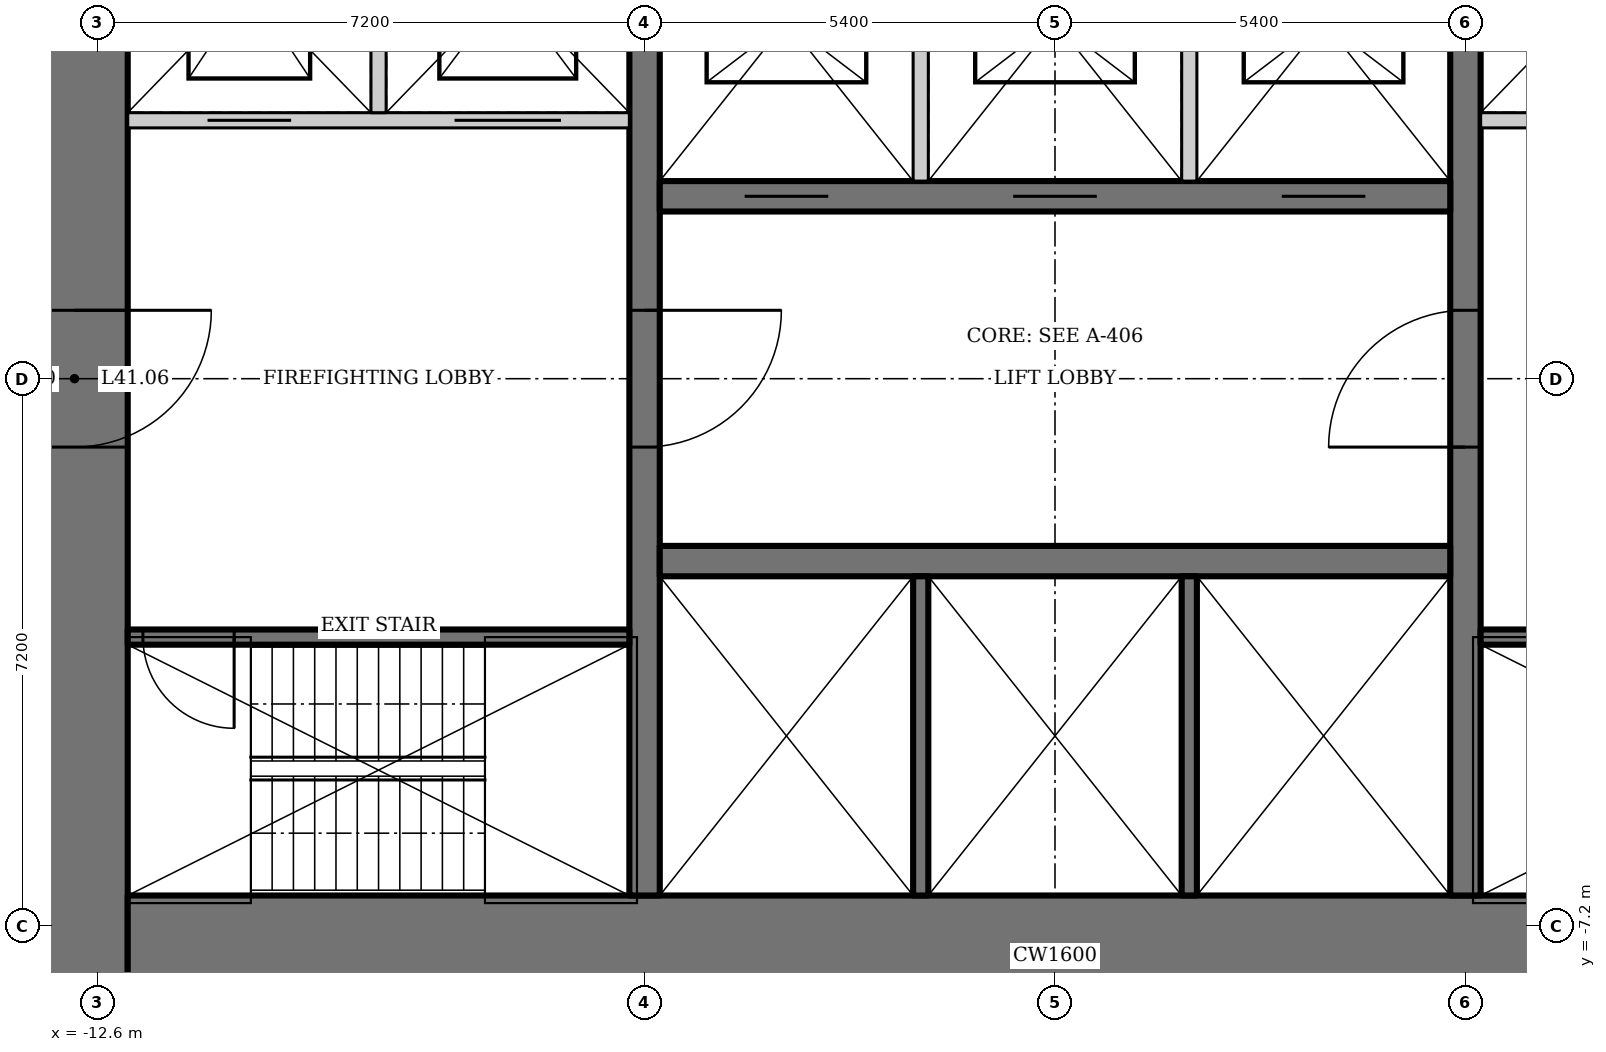
"""IFC4 building model, lengths in metres.
Left out: names, types, materials, properties, quantities, classifications, styles, units other than length and angle.
Written with IfcOpenShell. Run it as: python <this file> out.ifc"""

import sys

from ifc_helpers import new_model, si_unit, direction, frame, frame_2d, origin, place, context, subcontext, project, spatial, rectangle, extrude, element, fill, save


model = new_model("IFC4")
c1 = context("Model", 3, precision=1e-05, world=origin(), true_north=direction((0.0, 1.0)))
c2 = subcontext(c1, "Body", "Model", "MODEL_VIEW")
j1 = project(units=[si_unit("LENGTHUNIT", "METRE"), si_unit("PLANEANGLEUNIT", "RADIAN")], contexts=[c1])
p1 = place(None, origin())
s1 = spatial("IfcSite", under=j1, at=p1, CompositionType="ELEMENT")
p2 = place(p1, origin())
s2 = spatial("IfcBuilding", under=s1, at=p2, CompositionType="ELEMENT")
p3 = place(p2, frame((0.0, 0.0, 176.2)))
s3 = spatial("IfcBuildingStorey", under=s2, at=p3, CompositionType="ELEMENT", Elevation=176.2)
p4 = place(p3, frame((-12.9, 13.0, 0.0), z_axis=(0.0, 0.0, 1.0), x_axis=(0.0, -1.0, 0.0)))
e1 = element("IfcWall", 1, at=p4, inside=s3, PredefinedType="SHEAR", context=c2, shape_type="SweptSolid", body=[
    extrude(rectangle(XDim=26.0, YDim=1.4, at=frame_2d((13.0, 0.0))), origin(), (0.0, 0.0, 1.0), 4.2),
])
p5 = place(p4, frame((12.1, 0.0, 0.0)))
e2 = element("IfcOpeningElement", 2, at=p5, cuts=e1, PredefinedType="OPENING", context=c2, shape_type="SweptSolid", body=[
    extrude(rectangle(XDim=1.8, YDim=2.1, at=frame_2d((0.9, 1.05))), frame((0.0, 0.71, 0.0), z_axis=(0.0, -1.0, 0.0), x_axis=(1.0, 0.0, 0.0)), (0.0, 0.0, 1.0), 1.42),
])
p6 = place(p3, frame((-12.2, -7.6, 0.0), z_axis=(0.0, 0.0, 1.0), x_axis=(1.0, 0.0, 0.0)))
e3 = element("IfcWall", 3, at=p6, inside=s3, PredefinedType="SHEAR", context=c2, shape_type="SweptSolid", body=[
    extrude(rectangle(XDim=24.4, YDim=1.6, at=frame_2d((12.2, 0.0))), origin(), (0.0, 0.0, 1.0), 4.2),
])
p7 = place(p3, frame((5.4, -6.8, 0.0), z_axis=(0.0, 0.0, 1.0), x_axis=(0.0, 1.0, 0.0)))
e4 = element("IfcWall", 4, at=p7, inside=s3, PredefinedType="SHEAR", context=c2, shape_type="SweptSolid", body=[
    extrude(rectangle(XDim=13.6, YDim=0.4, at=frame_2d((6.8, 0.0))), origin(), (0.0, 0.0, 1.0), 4.2),
])
p8 = place(p7, frame((5.9, 0.0, 0.0)))
e5 = element("IfcOpeningElement", 5, at=p8, cuts=e4, PredefinedType="OPENING", context=c2, shape_type="SweptSolid", body=[
    extrude(rectangle(XDim=1.8, YDim=2.1, at=frame_2d((0.9, 1.05))), frame((0.0, 0.21, 0.0), z_axis=(0.0, -1.0, 0.0), x_axis=(1.0, 0.0, 0.0)), (0.0, 0.0, 1.0), 0.42),
])
p9 = place(p3, frame((-5.4, 6.8, 0.0), z_axis=(0.0, 0.0, 1.0), x_axis=(0.0, -1.0, 0.0)))
e6 = element("IfcWall", 6, at=p9, inside=s3, PredefinedType="SHEAR", context=c2, shape_type="SweptSolid", body=[
    extrude(rectangle(XDim=13.6, YDim=0.4, at=frame_2d((6.8, 0.0))), origin(), (0.0, 0.0, 1.0), 4.2),
])
p10 = place(p9, frame((5.9, 0.0, 0.0)))
e7 = element("IfcOpeningElement", 7, at=p10, cuts=e6, PredefinedType="OPENING", context=c2, shape_type="SweptSolid", body=[
    extrude(rectangle(XDim=1.8, YDim=2.1, at=frame_2d((0.9, 1.05))), frame((0.0, 0.21, 0.0), z_axis=(0.0, -1.0, 0.0), x_axis=(1.0, 0.0, 0.0)), (0.0, 0.0, 1.0), 0.42),
])
p11 = place(p3, frame((-5.2, -2.4, 0.0), z_axis=(0.0, 0.0, 1.0), x_axis=(1.0, 0.0, 0.0)))
e8 = element("IfcWall", 8, at=p11, inside=s3, PredefinedType="SHEAR", context=c2, shape_type="SweptSolid", body=[
    extrude(rectangle(XDim=10.4, YDim=0.4, at=frame_2d((5.2, 0.0))), origin(), (0.0, 0.0, 1.0), 4.2),
])
for number, where, z_axis, x_axis in (
    (9, (-1.767, -2.6, 0.0), (0.0, 0.0, 1.0), (0.0, -1.0, 0.0)),
    (10, (1.767, -2.6, 0.0), (0.0, 0.0, 1.0), (0.0, -1.0, 0.0)),
):
    element("IfcWall", number, at=place(p3, frame(where, z_axis=z_axis, x_axis=x_axis)), inside=s3, PredefinedType="SOLIDWALL", context=c2, shape_type="SweptSolid", body=[
        extrude(rectangle(XDim=4.2, YDim=0.2, at=frame_2d((2.1, 0.0))), origin(), (0.0, 0.0, 1.0), 4.2),
    ])
p12 = place(p3, frame((5.2, 2.4, 0.0), z_axis=(0.0, 0.0, 1.0), x_axis=(-1.0, 0.0, 0.0)))
e11 = element("IfcWall", 11, at=p12, inside=s3, PredefinedType="SHEAR", context=c2, shape_type="SweptSolid", body=[
    extrude(rectangle(XDim=10.4, YDim=0.4, at=frame_2d((5.2, 0.0))), origin(), (0.0, 0.0, 1.0), 4.2),
])
p13 = place(p12, frame((8.183, 0.0, 0.0)))
e12 = element("IfcOpeningElement", 12, at=p13, cuts=e11, PredefinedType="OPENING", context=c2, shape_type="SweptSolid", body=[
    extrude(rectangle(XDim=1.1, YDim=2.2, at=frame_2d((0.55, 1.1))), frame((0.0, 0.21, 0.0), z_axis=(0.0, -1.0, 0.0), x_axis=(1.0, 0.0, 0.0)), (0.0, 0.0, 1.0), 0.42),
])
p14 = place(p12, frame((4.65, 0.0, 0.0)))
e13 = element("IfcOpeningElement", 13, at=p14, cuts=e11, PredefinedType="OPENING", context=c2, shape_type="SweptSolid", body=[
    extrude(rectangle(XDim=1.1, YDim=2.2, at=frame_2d((0.55, 1.1))), frame((0.0, 0.21, 0.0), z_axis=(0.0, -1.0, 0.0), x_axis=(1.0, 0.0, 0.0)), (0.0, 0.0, 1.0), 0.42),
])
p15 = place(p12, frame((1.117, 0.0, 0.0)))
e14 = element("IfcOpeningElement", 14, at=p15, cuts=e11, PredefinedType="OPENING", context=c2, shape_type="SweptSolid", body=[
    extrude(rectangle(XDim=1.1, YDim=2.2, at=frame_2d((0.55, 1.1))), frame((0.0, 0.21, 0.0), z_axis=(0.0, -1.0, 0.0), x_axis=(1.0, 0.0, 0.0)), (0.0, 0.0, 1.0), 0.42),
])
for number, where, z_axis, x_axis in (
    (15, (-1.767, 2.6, 0.0), (0.0, 0.0, 1.0), (0.0, 1.0, 0.0)),
    (16, (1.767, 2.6, 0.0), (0.0, 0.0, 1.0), (0.0, 1.0, 0.0)),
):
    element("IfcWall", number, at=place(p3, frame(where, z_axis=z_axis, x_axis=x_axis)), inside=s3, PredefinedType="SOLIDWALL", context=c2, shape_type="SweptSolid", body=[
        extrude(rectangle(XDim=4.2, YDim=0.2, at=frame_2d((2.1, 0.0))), origin(), (0.0, 0.0, 1.0), 4.2),
    ])
p16 = place(p3, frame((5.6, -3.4, 0.0), z_axis=(0.0, 0.0, 1.0), x_axis=(1.0, 0.0, 0.0)))
e17 = element("IfcWall", 17, at=p16, inside=s3, PredefinedType="SHEAR", context=c2, shape_type="SweptSolid", body=[
    extrude(rectangle(XDim=6.6, YDim=0.2, at=frame_2d((3.3, 0.0))), origin(), (0.0, 0.0, 1.0), 4.2),
])
p17 = place(p16, frame((5.2, 0.0, 0.0)))
e18 = element("IfcOpeningElement", 18, at=p17, cuts=e17, PredefinedType="OPENING", context=c2, shape_type="SweptSolid", body=[
    extrude(rectangle(XDim=1.2, YDim=2.1, at=frame_2d((0.6, 1.05))), frame((0.0, 0.11, 0.0), z_axis=(0.0, -1.0, 0.0), x_axis=(1.0, 0.0, 0.0)), (0.0, 0.0, 1.0), 0.22),
])
p18 = place(p3, frame((12.2, 3.4, 0.0), z_axis=(0.0, 0.0, 1.0), x_axis=(-1.0, 0.0, 0.0)))
e19 = element("IfcWall", 19, at=p18, inside=s3, PredefinedType="SOLIDWALL", context=c2, shape_type="SweptSolid", body=[
    extrude(rectangle(XDim=6.6, YDim=0.2, at=frame_2d((3.3, 0.0))), origin(), (0.0, 0.0, 1.0), 4.2),
])
p19 = place(p18, frame((4.45, 0.0, 0.0)))
e20 = element("IfcOpeningElement", 20, at=p19, cuts=e19, PredefinedType="OPENING", context=c2, shape_type="SweptSolid", body=[
    extrude(rectangle(XDim=1.1, YDim=2.2, at=frame_2d((0.55, 1.1))), frame((0.0, 0.11, 0.0), z_axis=(0.0, -1.0, 0.0), x_axis=(1.0, 0.0, 0.0)), (0.0, 0.0, 1.0), 0.22),
])
p20 = place(p18, frame((0.9, 0.0, 0.0)))
e21 = element("IfcOpeningElement", 21, at=p20, cuts=e19, PredefinedType="OPENING", context=c2, shape_type="SweptSolid", body=[
    extrude(rectangle(XDim=1.4, YDim=2.2, at=frame_2d((0.7, 1.1))), frame((0.0, 0.11, 0.0), z_axis=(0.0, -1.0, 0.0), x_axis=(1.0, 0.0, 0.0)), (0.0, 0.0, 1.0), 0.22),
])
p21 = place(p3, frame((-5.6, -3.4, 0.0), z_axis=(0.0, 0.0, 1.0), x_axis=(-1.0, 0.0, 0.0)))
e22 = element("IfcWall", 22, at=p21, inside=s3, PredefinedType="SHEAR", context=c2, shape_type="SweptSolid", body=[
    extrude(rectangle(XDim=6.6, YDim=0.2, at=frame_2d((3.3, 0.0))), origin(), (0.0, 0.0, 1.0), 4.2),
])
p22 = place(p21, frame((5.2, 0.0, 0.0)))
e23 = element("IfcOpeningElement", 23, at=p22, cuts=e22, PredefinedType="OPENING", context=c2, shape_type="SweptSolid", body=[
    extrude(rectangle(XDim=1.2, YDim=2.1, at=frame_2d((0.6, 1.05))), frame((0.0, 0.11, 0.0), z_axis=(0.0, -1.0, 0.0), x_axis=(1.0, 0.0, 0.0)), (0.0, 0.0, 1.0), 0.22),
])
p23 = place(p3, frame((-12.2, 3.4, 0.0), z_axis=(0.0, 0.0, 1.0), x_axis=(1.0, 0.0, 0.0)))
e24 = element("IfcWall", 24, at=p23, inside=s3, PredefinedType="SOLIDWALL", context=c2, shape_type="SweptSolid", body=[
    extrude(rectangle(XDim=6.6, YDim=0.2, at=frame_2d((3.3, 0.0))), origin(), (0.0, 0.0, 1.0), 4.2),
])
p24 = place(p23, frame((1.05, 0.0, 0.0)))
e25 = element("IfcOpeningElement", 25, at=p24, cuts=e24, PredefinedType="OPENING", context=c2, shape_type="SweptSolid", body=[
    extrude(rectangle(XDim=1.1, YDim=2.2, at=frame_2d((0.55, 1.1))), frame((0.0, 0.11, 0.0), z_axis=(0.0, -1.0, 0.0), x_axis=(1.0, 0.0, 0.0)), (0.0, 0.0, 1.0), 0.22),
])
p25 = place(p23, frame((4.3, 0.0, 0.0)))
e26 = element("IfcOpeningElement", 26, at=p25, cuts=e24, PredefinedType="OPENING", context=c2, shape_type="SweptSolid", body=[
    extrude(rectangle(XDim=1.4, YDim=2.2, at=frame_2d((0.7, 1.1))), frame((0.0, 0.11, 0.0), z_axis=(0.0, -1.0, 0.0), x_axis=(1.0, 0.0, 0.0)), (0.0, 0.0, 1.0), 0.22),
])
p26 = place(p3, frame((-8.9, 3.5, 0.0), z_axis=(0.0, 0.0, 1.0), x_axis=(0.0, 1.0, 0.0)))
e27 = element("IfcWall", 27, at=p26, inside=s3, PredefinedType="SOLIDWALL", context=c2, shape_type="SweptSolid", body=[
    extrude(rectangle(XDim=3.3, YDim=0.2, at=frame_2d((1.65, 0.0))), origin(), (0.0, 0.0, 1.0), 4.2),
])
p27 = place(p8, origin())
e28 = element("IfcDoor", 28, at=p27, inside=s3, OperationType="DOUBLE_DOOR_DOUBLE_SWING", PredefinedType="DOOR", context=c2, shape_type="SweptSolid", body=[
    extrude(rectangle(XDim=1.8, YDim=2.1, at=frame_2d((0.9, 1.05))), frame((0.0, 0.025, 0.0), z_axis=(0.0, -1.0, 0.0), x_axis=(1.0, 0.0, 0.0)), (0.0, 0.0, 1.0), 0.05),
])
fill(e5, e28)
p28 = place(p10, origin())
e29 = element("IfcDoor", 29, at=p28, inside=s3, OperationType="DOUBLE_DOOR_DOUBLE_SWING", PredefinedType="DOOR", context=c2, shape_type="SweptSolid", body=[
    extrude(rectangle(XDim=1.8, YDim=2.1, at=frame_2d((0.9, 1.05))), frame((0.0, 0.025, 0.0), z_axis=(0.0, -1.0, 0.0), x_axis=(1.0, 0.0, 0.0)), (0.0, 0.0, 1.0), 0.05),
])
fill(e7, e29)
p29 = place(p22, origin())
e30 = element("IfcDoor", 30, at=p29, inside=s3, OperationType="SINGLE_SWING_RIGHT", PredefinedType="DOOR", context=c2, shape_type="SweptSolid", body=[
    extrude(rectangle(XDim=1.2, YDim=2.1, at=frame_2d((0.6, 1.05))), frame((0.0, 0.025, 0.0), z_axis=(0.0, -1.0, 0.0), x_axis=(1.0, 0.0, 0.0)), (0.0, 0.0, 1.0), 0.05),
])
fill(e23, e30)
p30 = place(p5, origin())
e31 = element("IfcDoor", 31, at=p30, inside=s3, OperationType="DOUBLE_DOOR_DOUBLE_SWING", PredefinedType="DOOR", context=c2, shape_type="SweptSolid", body=[
    extrude(rectangle(XDim=1.8, YDim=2.1, at=frame_2d((0.9, 1.05))), frame((0.0, 0.025, 0.0), z_axis=(0.0, -1.0, 0.0), x_axis=(1.0, 0.0, 0.0)), (0.0, 0.0, 1.0), 0.05),
])
fill(e2, e31)
p31 = place(p13, origin())
e32 = element("IfcDoor", 32, at=p31, inside=s3, OperationType="DOUBLE_DOOR_SLIDING", PredefinedType="DOOR", context=c2, shape_type="SweptSolid", body=[
    extrude(rectangle(XDim=1.1, YDim=2.2, at=frame_2d((0.55, 1.1))), frame((0.0, 0.025, 0.0), z_axis=(0.0, -1.0, 0.0), x_axis=(1.0, 0.0, 0.0)), (0.0, 0.0, 1.0), 0.05),
])
fill(e12, e32)
p32 = place(p14, origin())
e33 = element("IfcDoor", 33, at=p32, inside=s3, OperationType="DOUBLE_DOOR_SLIDING", PredefinedType="DOOR", context=c2, shape_type="SweptSolid", body=[
    extrude(rectangle(XDim=1.1, YDim=2.2, at=frame_2d((0.55, 1.1))), frame((0.0, 0.025, 0.0), z_axis=(0.0, -1.0, 0.0), x_axis=(1.0, 0.0, 0.0)), (0.0, 0.0, 1.0), 0.05),
])
fill(e13, e33)
p33 = place(p15, origin())
e34 = element("IfcDoor", 34, at=p33, inside=s3, OperationType="DOUBLE_DOOR_SLIDING", PredefinedType="DOOR", context=c2, shape_type="SweptSolid", body=[
    extrude(rectangle(XDim=1.1, YDim=2.2, at=frame_2d((0.55, 1.1))), frame((0.0, 0.025, 0.0), z_axis=(0.0, -1.0, 0.0), x_axis=(1.0, 0.0, 0.0)), (0.0, 0.0, 1.0), 0.05),
])
fill(e14, e34)
p34 = place(p24, origin())
e35 = element("IfcDoor", 35, at=p34, inside=s3, OperationType="DOUBLE_DOOR_SLIDING", PredefinedType="DOOR", context=c2, shape_type="SweptSolid", body=[
    extrude(rectangle(XDim=1.1, YDim=2.2, at=frame_2d((0.55, 1.1))), frame((0.0, 0.025, 0.0), z_axis=(0.0, -1.0, 0.0), x_axis=(1.0, 0.0, 0.0)), (0.0, 0.0, 1.0), 0.05),
])
fill(e25, e35)
p35 = place(p25, origin())
e36 = element("IfcDoor", 36, at=p35, inside=s3, OperationType="DOUBLE_DOOR_SLIDING", PredefinedType="DOOR", context=c2, shape_type="SweptSolid", body=[
    extrude(rectangle(XDim=1.4, YDim=2.2, at=frame_2d((0.7, 1.1))), frame((0.0, 0.025, 0.0), z_axis=(0.0, -1.0, 0.0), x_axis=(1.0, 0.0, 0.0)), (0.0, 0.0, 1.0), 0.05),
])
fill(e26, e36)
save(model, sys.argv[1])
